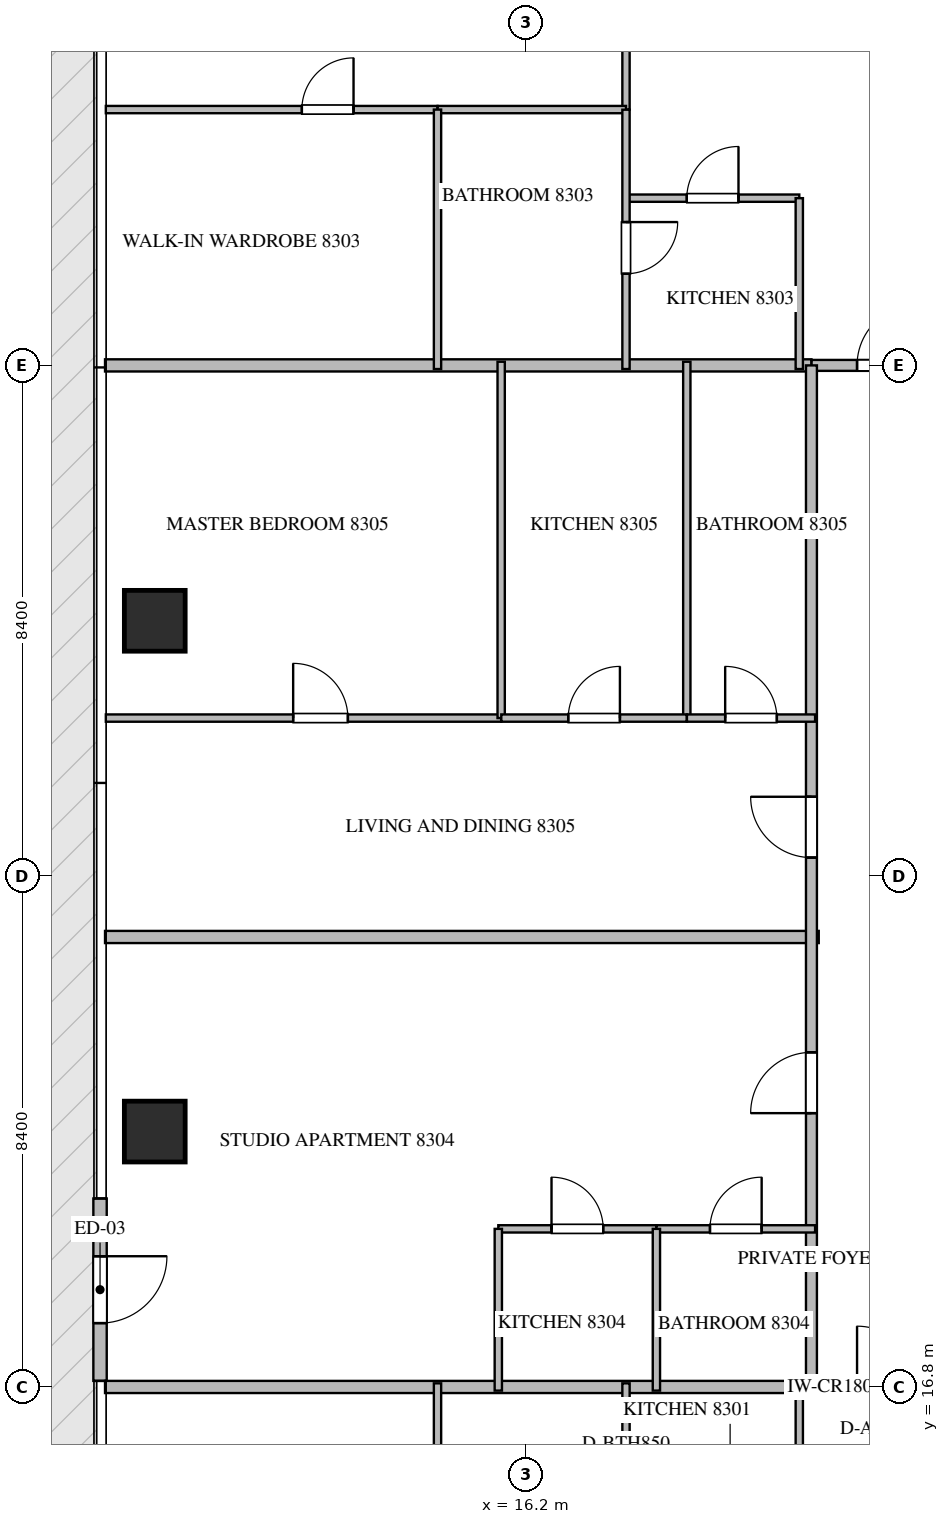
"""IFC4 building model, lengths in metres.
Left out: names, types, materials, properties, quantities, classifications, styles, units other than length and angle.
Written with IfcOpenShell. Run it as: python <this file> out.ifc"""

import sys

from ifc_helpers import new_model, si_unit, direction, frame, frame_2d, origin, origin_2d, place, context, subcontext, project, spatial, rectangle, extrude, source, transform, mapped, element, fill, save


model = new_model("IFC4")
c1 = context("Model", 3, precision=1e-05, world=origin(), true_north=direction((0.0, 1.0)))
c2 = subcontext(c1, "Body", "Model", "MODEL_VIEW")
j1 = project(units=[si_unit("LENGTHUNIT", "METRE"), si_unit("PLANEANGLEUNIT", "RADIAN")], contexts=[c1])
p1 = place(None, origin())
s1 = spatial("IfcSite", under=j1, at=p1, CompositionType="ELEMENT")
p2 = place(p1, origin())
s2 = spatial("IfcBuilding", under=s1, at=p2, CompositionType="ELEMENT")
p3 = place(p2, frame((0.0, 0.0, 333.95)))
s3 = spatial("IfcBuildingStorey", under=s2, at=p3, CompositionType="ELEMENT", Elevation=333.95)
m1 = source(origin(), c2, "Body", "SweptSolid", [
    extrude(rectangle(XDim=1.0, YDim=1.0, at=origin_2d()), origin(), (0.0, 0.0, 1.0), 3.87),
])
for number, where, z_axis, x_axis in (
    (1, (10.1, 21.0, -0.26), (0.0, 0.0, 1.0), (1.0, 0.0, 0.0)),
    (2, (10.1, 29.4, -0.26), (0.0, 0.0, 1.0), (1.0, 0.0, 0.0)),
):
    element("IfcColumn", number, at=place(p3, frame(where, z_axis=z_axis, x_axis=x_axis)), inside=s3, PredefinedType="COLUMN", context=c2, shape_type="MappedRepresentation", body=[
        mapped(m1, transform((0.0, 0.0, 0.0), scale=1.0)),
    ])
p4 = place(p3, frame((9.2, 19.9, 0.0), z_axis=(0.0, 0.0, 1.0), x_axis=(0.0, -1.0, 0.0)))
e3 = element("IfcWall", 3, at=p4, inside=s3, PredefinedType="ELEMENTEDWALL", context=c2, shape_type="SweptSolid", body=[
    extrude(rectangle(XDim=3.0, YDim=0.22, at=frame_2d((1.5, 0.0))), origin(), (0.0, 0.0, 1.0), 3.595),
])
p5 = place(p4, frame((0.95, 0.0, 0.0)))
e4 = element("IfcOpeningElement", 4, at=p5, cuts=e3, PredefinedType="OPENING", context=c2, shape_type="SweptSolid", body=[
    extrude(rectangle(XDim=1.1, YDim=2.2, at=frame_2d((0.55, 1.1))), frame((0.0, 0.12, 0.0), z_axis=(0.0, -1.0, 0.0), x_axis=(1.0, 0.0, 0.0)), (0.0, 0.0, 1.0), 0.24),
])
p6 = place(p3, frame((9.282, 24.2, 0.0), z_axis=(0.0, 0.0, 1.0), x_axis=(1.0, 0.0, 0.0)))
e5 = element("IfcWall", 5, at=p6, inside=s3, PredefinedType="PARTITIONING", context=c2, shape_type="SweptSolid", body=[
    extrude(rectangle(XDim=11.738, YDim=0.2, at=frame_2d((5.869, 0.0))), origin(), (0.0, 0.0, 1.0), 3.61),
])
for number, where, z_axis, x_axis in (
    (6, (9.282, 16.8, 0.0), (0.0, 0.0, 1.0), (1.0, 0.0, 0.0)),
    (7, (9.282, 33.6, 0.0), (0.0, 0.0, 1.0), (1.0, 0.0, 0.0)),
):
    element("IfcWall", number, at=place(p3, frame(where, z_axis=z_axis, x_axis=x_axis)), inside=s3, PredefinedType="PARTITIONING", context=c2, shape_type="SweptSolid", body=[
        extrude(rectangle(XDim=11.618, YDim=0.2, at=frame_2d((5.809, 0.0))), origin(), (0.0, 0.0, 1.0), 3.61),
    ])
p7 = place(p3, frame((20.902, 16.8, 0.0), z_axis=(0.0, 0.0, 1.0), x_axis=(1.0, 0.0, 0.0)))
e8 = element("IfcWall", 8, at=p7, inside=s3, PredefinedType="PARTITIONING", context=c2, shape_type="SweptSolid", body=[
    extrude(rectangle(XDim=2.496, YDim=0.18, at=frame_2d((1.248, 0.0))), origin(), (0.0, 0.0, 1.0), 3.61),
])
p8 = place(p7, frame((0.748, 0.0, 0.0)))
e9 = element("IfcOpeningElement", 9, at=p8, cuts=e8, PredefinedType="OPENING", context=c2, shape_type="SweptSolid", body=[
    extrude(rectangle(XDim=1.0, YDim=2.15, at=frame_2d((0.5, 1.075))), frame((0.0, 0.1, 0.0), z_axis=(0.0, -1.0, 0.0), x_axis=(1.0, 0.0, 0.0)), (0.0, 0.0, 1.0), 0.2),
])
p9 = place(p3, frame((20.902, 33.6, 0.0), z_axis=(0.0, 0.0, 1.0), x_axis=(1.0, 0.0, 0.0)))
e10 = element("IfcWall", 10, at=p9, inside=s3, PredefinedType="PARTITIONING", context=c2, shape_type="SweptSolid", body=[
    extrude(rectangle(XDim=2.496, YDim=0.18, at=frame_2d((1.248, 0.0))), origin(), (0.0, 0.0, 1.0), 3.61),
])
p10 = place(p9, frame((0.748, 0.0, 0.0)))
e11 = element("IfcOpeningElement", 11, at=p10, cuts=e10, PredefinedType="OPENING", context=c2, shape_type="SweptSolid", body=[
    extrude(rectangle(XDim=1.0, YDim=2.15, at=frame_2d((0.5, 1.075))), frame((0.0, 0.1, 0.0), z_axis=(0.0, -1.0, 0.0), x_axis=(1.0, 0.0, 0.0)), (0.0, 0.0, 1.0), 0.2),
])
p11 = place(p3, frame((20.9, 16.8, 0.0), z_axis=(0.0, 0.0, 1.0), x_axis=(0.0, 1.0, 0.0)))
e12 = element("IfcWall", 12, at=p11, inside=s3, PredefinedType="PARTITIONING", context=c2, shape_type="SweptSolid", body=[
    extrude(rectangle(XDim=16.8, YDim=0.18, at=frame_2d((8.4, 0.0))), origin(), (0.0, 0.0, 1.0), 3.61),
])
p12 = place(p11, frame((4.503, 0.0, 0.0)))
e13 = element("IfcOpeningElement", 13, at=p12, cuts=e12, PredefinedType="OPENING", context=c2, shape_type="SweptSolid", body=[
    extrude(rectangle(XDim=1.0, YDim=2.15, at=frame_2d((0.5, 1.075))), frame((0.0, 0.1, 0.0), z_axis=(0.0, -1.0, 0.0), x_axis=(1.0, 0.0, 0.0)), (0.0, 0.0, 1.0), 0.2),
])
p13 = place(p11, frame((8.706, 0.0, 0.0)))
e14 = element("IfcOpeningElement", 14, at=p13, cuts=e12, PredefinedType="OPENING", context=c2, shape_type="SweptSolid", body=[
    extrude(rectangle(XDim=1.0, YDim=2.15, at=frame_2d((0.5, 1.075))), frame((0.0, 0.1, 0.0), z_axis=(0.0, -1.0, 0.0), x_axis=(1.0, 0.0, 0.0)), (0.0, 0.0, 1.0), 0.2),
])
p14 = place(p3, frame((20.7, 14.05, 0.0), z_axis=(0.0, 0.0, 1.0), x_axis=(0.0, 1.0, 0.0)))
e15 = element("IfcWall", 15, at=p14, inside=s3, PredefinedType="PARTITIONING", context=c2, shape_type="SweptSolid", body=[
    extrude(rectangle(XDim=2.81, YDim=0.12, at=frame_2d((1.405, 0.0))), origin(), (0.0, 0.0, 1.0), 3.61),
])
p15 = place(p3, frame((14.75, 12.593, 0.0), z_axis=(0.0, 0.0, 1.0), x_axis=(0.0, 1.0, 0.0)))
e16 = element("IfcWall", 16, at=p15, inside=s3, PredefinedType="PARTITIONING", context=c2, shape_type="SweptSolid", body=[
    extrude(rectangle(XDim=4.267, YDim=0.12, at=frame_2d((2.134, 0.0))), origin(), (0.0, 0.0, 1.0), 3.61),
])
p16 = place(p3, frame((17.85, 12.595, 0.0), z_axis=(0.0, 0.0, 1.0), x_axis=(0.0, 1.0, 0.0)))
e17 = element("IfcWall", 17, at=p16, inside=s3, PredefinedType="PARTITIONING", context=c2, shape_type="SweptSolid", body=[
    extrude(rectangle(XDim=4.265, YDim=0.12, at=frame_2d((2.133, 0.0))), origin(), (0.0, 0.0, 1.0), 2.445),
])
p17 = place(p16, frame((1.847, 0.0, 0.0)))
e18 = element("IfcOpeningElement", 18, at=p17, cuts=e17, PredefinedType="OPENING", context=c2, shape_type="SweptSolid", body=[
    extrude(rectangle(XDim=0.85, YDim=2.1, at=frame_2d((0.425, 1.05))), frame((0.0, 0.07, 0.0), z_axis=(0.0, -1.0, 0.0), x_axis=(1.0, 0.0, 0.0)), (0.0, 0.0, 1.0), 0.14),
])
p18 = place(p3, frame((17.85, 36.35, 0.0), z_axis=(0.0, 0.0, 1.0), x_axis=(1.0, 0.0, 0.0)))
e19 = element("IfcWall", 19, at=p18, inside=s3, PredefinedType="PARTITIONING", context=c2, shape_type="SweptSolid", body=[
    extrude(rectangle(XDim=2.85, YDim=0.12, at=frame_2d((1.425, 0.0))), origin(), (0.0, 0.0, 1.0), 3.332),
])
p19 = place(p18, frame((1.0, 0.0, 0.0)))
e20 = element("IfcOpeningElement", 20, at=p19, cuts=e19, PredefinedType="OPENING", context=c2, shape_type="SweptSolid", body=[
    extrude(rectangle(XDim=0.85, YDim=2.1, at=frame_2d((0.425, 1.05))), frame((0.0, 0.07, 0.0), z_axis=(0.0, -1.0, 0.0), x_axis=(1.0, 0.0, 0.0)), (0.0, 0.0, 1.0), 0.14),
])
p20 = place(p3, frame((20.7, 36.35, 0.0), z_axis=(0.0, 0.0, 1.0), x_axis=(0.0, -1.0, 0.0)))
e21 = element("IfcWall", 21, at=p20, inside=s3, PredefinedType="PARTITIONING", context=c2, shape_type="SweptSolid", body=[
    extrude(rectangle(XDim=2.81, YDim=0.12, at=frame_2d((1.405, 0.0))), origin(), (0.0, 0.0, 1.0), 3.61),
])
p21 = place(p3, frame((17.85, 47.905, 0.0), z_axis=(0.0, 0.0, 1.0), x_axis=(0.0, -1.0, 0.0)))
e22 = element("IfcWall", 22, at=p21, inside=s3, PredefinedType="PARTITIONING", context=c2, shape_type="SweptSolid", body=[
    extrude(rectangle(XDim=10.098, YDim=0.12, at=frame_2d((5.049, 0.0))), origin(), (0.0, 0.0, 1.0), 2.445),
])
p22 = place(p21, frame((5.059, 0.0, 0.0)))
e23 = element("IfcOpeningElement", 23, at=p22, cuts=e22, PredefinedType="OPENING", context=c2, shape_type="SweptSolid", body=[
    extrude(rectangle(XDim=0.9, YDim=2.1, at=frame_2d((0.45, 1.05))), frame((0.0, 0.07, 0.0), z_axis=(0.0, -1.0, 0.0), x_axis=(1.0, 0.0, 0.0)), (0.0, 0.0, 1.0), 0.14),
])
p23 = place(p3, frame((9.295, 37.807, 0.0), z_axis=(0.0, 0.0, 1.0), x_axis=(1.0, 0.0, 0.0)))
e24 = element("IfcWall", 24, at=p23, inside=s3, PredefinedType="PARTITIONING", context=c2, shape_type="SweptSolid", body=[
    extrude(rectangle(XDim=5.455, YDim=0.12, at=frame_2d((2.728, 0.0))), origin(), (0.0, 0.0, 1.0), 3.61),
])
p24 = place(p23, frame((3.224, 0.0, 0.0)))
e25 = element("IfcOpeningElement", 25, at=p24, cuts=e24, PredefinedType="OPENING", context=c2, shape_type="SweptSolid", body=[
    extrude(rectangle(XDim=0.85, YDim=2.1, at=frame_2d((0.425, 1.05))), frame((0.0, 0.07, 0.0), z_axis=(0.0, -1.0, 0.0), x_axis=(1.0, 0.0, 0.0)), (0.0, 0.0, 1.0), 0.14),
])
p25 = place(p3, frame((14.752, 37.807, 0.0), z_axis=(0.0, 0.0, 1.0), x_axis=(1.0, 0.0, 0.0)))
e26 = element("IfcWall", 26, at=p25, inside=s3, PredefinedType="PARTITIONING", context=c2, shape_type="SweptSolid", body=[
    extrude(rectangle(XDim=3.098, YDim=0.12, at=frame_2d((1.549, 0.0))), origin(), (0.0, 0.0, 1.0), 3.61),
])
p26 = place(p3, frame((14.75, 37.807, 0.0), z_axis=(0.0, 0.0, 1.0), x_axis=(0.0, -1.0, 0.0)))
e27 = element("IfcWall", 27, at=p26, inside=s3, PredefinedType="PARTITIONING", context=c2, shape_type="SweptSolid", body=[
    extrude(rectangle(XDim=4.267, YDim=0.12, at=frame_2d((2.133, 0.0))), origin(), (0.0, 0.0, 1.0), 3.61),
])
p27 = place(p3, frame((17.85, 37.805, 0.0), z_axis=(0.0, 0.0, 1.0), x_axis=(0.0, -1.0, 0.0)))
e28 = element("IfcWall", 28, at=p27, inside=s3, PredefinedType="PARTITIONING", context=c2, shape_type="SweptSolid", body=[
    extrude(rectangle(XDim=4.265, YDim=0.12, at=frame_2d((2.132, 0.0))), origin(), (0.0, 0.0, 1.0), 2.445),
])
p28 = place(p27, frame((1.848, 0.0, 0.0)))
e29 = element("IfcOpeningElement", 29, at=p28, cuts=e28, PredefinedType="OPENING", context=c2, shape_type="SweptSolid", body=[
    extrude(rectangle(XDim=0.85, YDim=2.1, at=frame_2d((0.425, 1.05))), frame((0.0, 0.07, 0.0), z_axis=(0.0, -1.0, 0.0), x_axis=(1.0, 0.0, 0.0)), (0.0, 0.0, 1.0), 0.14),
])
p29 = place(p3, frame((15.75, 19.4, 0.0), z_axis=(0.0, 0.0, 1.0), x_axis=(1.0, 0.0, 0.0)))
e30 = element("IfcWall", 30, at=p29, inside=s3, PredefinedType="PARTITIONING", context=c2, shape_type="SweptSolid", body=[
    extrude(rectangle(XDim=2.6, YDim=0.12, at=frame_2d((1.3, 0.0))), origin(), (0.0, 0.0, 1.0), 3.61),
])
p30 = place(p29, frame((0.875, 0.0, 0.0)))
e31 = element("IfcOpeningElement", 31, at=p30, cuts=e30, PredefinedType="OPENING", context=c2, shape_type="SweptSolid", body=[
    extrude(rectangle(XDim=0.85, YDim=2.1, at=frame_2d((0.425, 1.05))), frame((0.0, 0.07, 0.0), z_axis=(0.0, -1.0, 0.0), x_axis=(1.0, 0.0, 0.0)), (0.0, 0.0, 1.0), 0.14),
])
p31 = place(p3, frame((18.352, 19.4, 0.0), z_axis=(0.0, 0.0, 1.0), x_axis=(1.0, 0.0, 0.0)))
e32 = element("IfcWall", 32, at=p31, inside=s3, PredefinedType="PARTITIONING", context=c2, shape_type="SweptSolid", body=[
    extrude(rectangle(XDim=2.608, YDim=0.12, at=frame_2d((1.304, 0.0))), origin(), (0.0, 0.0, 1.0), 3.61),
])
p32 = place(p31, frame((0.879, 0.0, 0.0)))
e33 = element("IfcOpeningElement", 33, at=p32, cuts=e32, PredefinedType="OPENING", context=c2, shape_type="SweptSolid", body=[
    extrude(rectangle(XDim=0.85, YDim=2.1, at=frame_2d((0.425, 1.05))), frame((0.0, 0.07, 0.0), z_axis=(0.0, -1.0, 0.0), x_axis=(1.0, 0.0, 0.0)), (0.0, 0.0, 1.0), 0.14),
])
for number, where, z_axis, x_axis in (
    (34, (18.35, 16.74, 0.0), (0.0, 0.0, 1.0), (0.0, 1.0, 0.0)),
    (35, (15.75, 16.74, 0.0), (0.0, 0.0, 1.0), (0.0, 1.0, 0.0)),
):
    element("IfcWall", number, at=place(p3, frame(where, z_axis=z_axis, x_axis=x_axis)), inside=s3, PredefinedType="PARTITIONING", context=c2, shape_type="SweptSolid", body=[
        extrude(rectangle(XDim=2.66, YDim=0.12, at=frame_2d((1.33, 0.0))), origin(), (0.0, 0.0, 1.0), 3.61),
    ])
p33 = place(p3, frame((9.295, 27.8, 0.0), z_axis=(0.0, 0.0, 1.0), x_axis=(1.0, 0.0, 0.0)))
e36 = element("IfcWall", 36, at=p33, inside=s3, PredefinedType="PARTITIONING", context=c2, shape_type="SweptSolid", body=[
    extrude(rectangle(XDim=6.502, YDim=0.12, at=frame_2d((3.251, 0.0))), origin(), (0.0, 0.0, 1.0), 3.61),
])
p34 = place(p33, frame((3.081, 0.0, 0.0)))
e37 = element("IfcOpeningElement", 37, at=p34, cuts=e36, PredefinedType="OPENING", context=c2, shape_type="SweptSolid", body=[
    extrude(rectangle(XDim=0.9, YDim=2.1, at=frame_2d((0.45, 1.05))), frame((0.0, 0.07, 0.0), z_axis=(0.0, -1.0, 0.0), x_axis=(1.0, 0.0, 0.0)), (0.0, 0.0, 1.0), 0.14),
])
for number, where, z_axis, x_axis in (
    (38, (15.797, 27.8, 0.0), (0.0, 0.0, 1.0), (0.0, 1.0, 0.0)),
    (39, (18.85, 27.8, 0.0), (0.0, 0.0, 1.0), (0.0, 1.0, 0.0)),
):
    element("IfcWall", number, at=place(p3, frame(where, z_axis=z_axis, x_axis=x_axis)), inside=s3, PredefinedType="PARTITIONING", context=c2, shape_type="SweptSolid", body=[
        extrude(rectangle(XDim=5.86, YDim=0.12, at=frame_2d((2.93, 0.0))), origin(), (0.0, 0.0, 1.0), 3.61),
    ])
p35 = place(p3, frame((15.799, 27.8, 0.0), z_axis=(0.0, 0.0, 1.0), x_axis=(1.0, 0.0, 0.0)))
e40 = element("IfcWall", 40, at=p35, inside=s3, PredefinedType="PARTITIONING", context=c2, shape_type="SweptSolid", body=[
    extrude(rectangle(XDim=3.051, YDim=0.12, at=frame_2d((1.525, 0.0))), origin(), (0.0, 0.0, 1.0), 3.61),
])
p36 = place(p35, frame((1.101, 0.0, 0.0)))
e41 = element("IfcOpeningElement", 41, at=p36, cuts=e40, PredefinedType="OPENING", context=c2, shape_type="SweptSolid", body=[
    extrude(rectangle(XDim=0.85, YDim=2.1, at=frame_2d((0.425, 1.05))), frame((0.0, 0.07, 0.0), z_axis=(0.0, -1.0, 0.0), x_axis=(1.0, 0.0, 0.0)), (0.0, 0.0, 1.0), 0.14),
])
p37 = place(p3, frame((18.852, 27.8, 0.0), z_axis=(0.0, 0.0, 1.0), x_axis=(1.0, 0.0, 0.0)))
e42 = element("IfcWall", 42, at=p37, inside=s3, PredefinedType="PARTITIONING", context=c2, shape_type="SweptSolid", body=[
    extrude(rectangle(XDim=2.108, YDim=0.12, at=frame_2d((1.054, 0.0))), origin(), (0.0, 0.0, 1.0), 3.61),
])
p38 = place(p37, frame((0.629, 0.0, 0.0)))
e43 = element("IfcOpeningElement", 43, at=p38, cuts=e42, PredefinedType="OPENING", context=c2, shape_type="SweptSolid", body=[
    extrude(rectangle(XDim=0.85, YDim=2.1, at=frame_2d((0.425, 1.05))), frame((0.0, 0.07, 0.0), z_axis=(0.0, -1.0, 0.0), x_axis=(1.0, 0.0, 0.0)), (0.0, 0.0, 1.0), 0.14),
])
m2 = source(origin(), c2, "Body", "SweptSolid", [
    extrude(rectangle(XDim=1.1, YDim=2.2, at=frame_2d((0.55, 1.1))), frame((0.0, 0.025, 0.0), z_axis=(0.0, -1.0, 0.0), x_axis=(1.0, 0.0, 0.0)), (0.0, 0.0, 1.0), 0.05),
])
p39 = place(p5, origin())
e44 = element("IfcDoor", 44, at=p39, inside=s3, OperationType="SINGLE_SWING_LEFT", PredefinedType="DOOR", context=c2, shape_type="MappedRepresentation", body=[
    mapped(m2, transform((0.0, 0.0, 0.0), scale=1.0)),
])
fill(e4, e44)
m3 = source(origin(), c2, "Body", "SweptSolid", [
    extrude(rectangle(XDim=1.0, YDim=2.15, at=frame_2d((0.5, 1.075))), frame((0.0, 0.025, 0.0), z_axis=(0.0, -1.0, 0.0), x_axis=(1.0, 0.0, 0.0)), (0.0, 0.0, 1.0), 0.05),
])
p40 = place(p8, origin())
e45 = element("IfcDoor", 45, at=p40, inside=s3, OperationType="SINGLE_SWING_LEFT", PredefinedType="DOOR", context=c2, shape_type="MappedRepresentation", body=[
    mapped(m3, transform((0.0, 0.0, 0.0), scale=1.0)),
])
fill(e9, e45)
p41 = place(p10, origin())
e46 = element("IfcDoor", 46, at=p41, inside=s3, OperationType="SINGLE_SWING_RIGHT", PredefinedType="DOOR", context=c2, shape_type="MappedRepresentation", body=[
    mapped(m3, transform((0.0, 0.0, 0.0), scale=1.0)),
])
fill(e11, e46)
p42 = place(p12, origin())
e47 = element("IfcDoor", 47, at=p42, inside=s3, OperationType="SINGLE_SWING_LEFT", PredefinedType="DOOR", context=c2, shape_type="MappedRepresentation", body=[
    mapped(m3, transform((0.0, 0.0, 0.0), scale=1.0)),
])
fill(e13, e47)
p43 = place(p13, origin())
e48 = element("IfcDoor", 48, at=p43, inside=s3, OperationType="SINGLE_SWING_RIGHT", PredefinedType="DOOR", context=c2, shape_type="MappedRepresentation", body=[
    mapped(m3, transform((0.0, 0.0, 0.0), scale=1.0)),
])
fill(e14, e48)
m4 = source(origin(), c2, "Body", "SweptSolid", [
    extrude(rectangle(XDim=0.85, YDim=2.1, at=frame_2d((0.425, 1.05))), frame((0.0, 0.025, 0.0), z_axis=(0.0, -1.0, 0.0), x_axis=(1.0, 0.0, 0.0)), (0.0, 0.0, 1.0), 0.05),
])
p44 = place(p19, origin())
e49 = element("IfcDoor", 49, at=p44, inside=s3, OperationType="SINGLE_SWING_RIGHT", PredefinedType="DOOR", context=c2, shape_type="MappedRepresentation", body=[
    mapped(m4, transform((0.0, 0.0, 0.0), scale=1.0)),
])
fill(e20, e49)
p45 = place(p24, origin())
e50 = element("IfcDoor", 50, at=p45, inside=s3, OperationType="SINGLE_SWING_RIGHT", PredefinedType="DOOR", context=c2, shape_type="MappedRepresentation", body=[
    mapped(m4, transform((0.0, 0.0, 0.0), scale=1.0)),
])
fill(e25, e50)
p46 = place(p28, origin())
e51 = element("IfcDoor", 51, at=p46, inside=s3, OperationType="SINGLE_SWING_LEFT", PredefinedType="DOOR", context=c2, shape_type="MappedRepresentation", body=[
    mapped(m4, transform((0.0, 0.0, 0.0), scale=1.0)),
])
fill(e29, e51)
p47 = place(p30, origin())
e52 = element("IfcDoor", 52, at=p47, inside=s3, OperationType="SINGLE_SWING_LEFT", PredefinedType="DOOR", context=c2, shape_type="MappedRepresentation", body=[
    mapped(m4, transform((0.0, 0.0, 0.0), scale=1.0)),
])
fill(e31, e52)
p48 = place(p32, origin())
e53 = element("IfcDoor", 53, at=p48, inside=s3, OperationType="SINGLE_SWING_RIGHT", PredefinedType="DOOR", context=c2, shape_type="MappedRepresentation", body=[
    mapped(m4, transform((0.0, 0.0, 0.0), scale=1.0)),
])
fill(e33, e53)
m5 = source(origin(), c2, "Body", "SweptSolid", [
    extrude(rectangle(XDim=0.9, YDim=2.1, at=frame_2d((0.45, 1.05))), frame((0.0, 0.025, 0.0), z_axis=(0.0, -1.0, 0.0), x_axis=(1.0, 0.0, 0.0)), (0.0, 0.0, 1.0), 0.05),
])
p49 = place(p34, origin())
e54 = element("IfcDoor", 54, at=p49, inside=s3, OperationType="SINGLE_SWING_LEFT", PredefinedType="DOOR", context=c2, shape_type="MappedRepresentation", body=[
    mapped(m5, transform((0.0, 0.0, 0.0), scale=1.0)),
])
fill(e37, e54)
p50 = place(p36, origin())
e55 = element("IfcDoor", 55, at=p50, inside=s3, OperationType="SINGLE_SWING_RIGHT", PredefinedType="DOOR", context=c2, shape_type="MappedRepresentation", body=[
    mapped(m4, transform((0.0, 0.0, 0.0), scale=1.0)),
])
fill(e41, e55)
p51 = place(p38, origin())
e56 = element("IfcDoor", 56, at=p51, inside=s3, OperationType="SINGLE_SWING_LEFT", PredefinedType="DOOR", context=c2, shape_type="MappedRepresentation", body=[
    mapped(m4, transform((0.0, 0.0, 0.0), scale=1.0)),
])
fill(e43, e56)
save(model, sys.argv[1])
